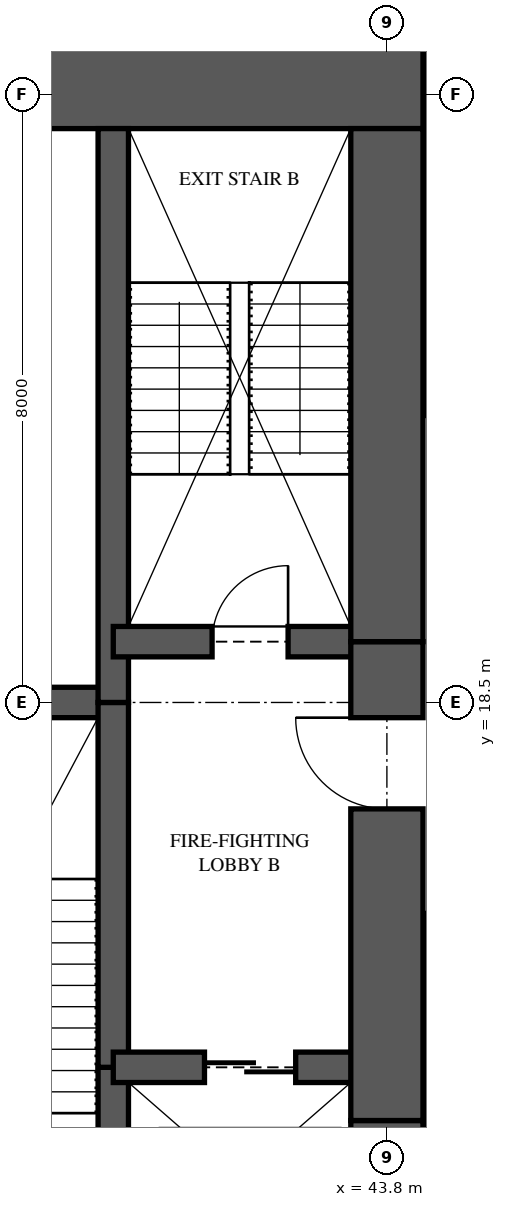
"""IFC4 building model, lengths in metres.
Left out: names, types, materials, properties, quantities, classifications, styles, units other than length and angle.
Written with IfcOpenShell. Run it as: python <this file> out.ifc"""

import sys

from ifc_helpers import new_model, si_unit, direction, frame, frame_2d, origin, place, context, subcontext, project, spatial, rectangle, extrude, element, fill, save


model = new_model("IFC4")
c1 = context("Model", 3, precision=1e-05, world=origin(), true_north=direction((0.0, 1.0)))
c2 = subcontext(c1, "Body", "Model", "MODEL_VIEW")
j1 = project(units=[si_unit("LENGTHUNIT", "METRE"), si_unit("PLANEANGLEUNIT", "RADIAN")], contexts=[c1])
p1 = place(None, origin())
s1 = spatial("IfcSite", under=j1, at=p1, CompositionType="ELEMENT")
p2 = place(p1, origin())
s2 = spatial("IfcBuilding", under=s1, at=p2, CompositionType="ELEMENT")
p3 = place(p2, frame((0.0, 0.0, 41.1)))
s3 = spatial("IfcBuildingStorey", under=s2, at=p3, CompositionType="ELEMENT", Elevation=41.1)
p4 = place(p3, frame((44.275, 26.875, 0.0), z_axis=(0.0, 0.0, 1.0), x_axis=(-1.0, 0.0, 0.0)))
e1 = element("IfcWall", 1, at=p4, inside=s3, PredefinedType="SHEAR", context=c2, shape_type="SweptSolid", body=[
    extrude(rectangle(XDim=8.375, YDim=1.65, at=frame_2d((4.188, 0.0))), origin(), (0.0, 0.0, 1.0), 3.35),
])
p5 = place(p4, frame((5.775, 0.0, 0.0)))
e2 = element("IfcOpeningElement", 2, at=p5, cuts=e1, PredefinedType="OPENING", context=c2, shape_type="SweptSolid", body=[
    extrude(rectangle(XDim=0.9, YDim=2.1, at=frame_2d((0.45, 1.05))), frame((0.0, 0.835, 0.0), z_axis=(0.0, -1.0, 0.0), x_axis=(1.0, 0.0, 0.0)), (0.0, 0.0, 1.0), 1.67),
])
p6 = place(p3, frame((43.8, 10.95, 0.0), z_axis=(0.0, 0.0, 1.0), x_axis=(0.0, 1.0, 0.0)))
e3 = element("IfcWall", 3, at=p6, inside=s3, PredefinedType="SHEAR", context=c2, shape_type="SweptSolid", body=[
    extrude(rectangle(XDim=2.05, YDim=0.95, at=frame_2d((1.025, 0.0))), origin(), (0.0, 0.0, 1.0), 3.35),
])
p7 = place(p3, frame((43.8, 13.0, 0.0), z_axis=(0.0, 0.0, 1.0), x_axis=(0.0, 1.0, 0.0)))
e4 = element("IfcWall", 4, at=p7, inside=s3, PredefinedType="SHEAR", context=c2, shape_type="SweptSolid", body=[
    extrude(rectangle(XDim=6.3, YDim=0.95, at=frame_2d((3.15, 0.0))), origin(), (0.0, 0.0, 1.0), 3.35),
])
p8 = place(p7, frame((4.1, 0.0, 0.0)))
e5 = element("IfcOpeningElement", 5, at=p8, cuts=e4, PredefinedType="OPENING", context=c2, shape_type="SweptSolid", body=[
    extrude(rectangle(XDim=1.2, YDim=2.2, at=frame_2d((0.6, 1.1))), frame((0.0, 0.485, 0.0), z_axis=(0.0, -1.0, 0.0), x_axis=(1.0, 0.0, 0.0)), (0.0, 0.0, 1.0), 0.97),
])
p9 = place(p3, frame((43.8, 19.3, 0.0), z_axis=(0.0, 0.0, 1.0), x_axis=(0.0, 1.0, 0.0)))
e6 = element("IfcWall", 6, at=p9, inside=s3, PredefinedType="SHEAR", context=c2, shape_type="SweptSolid", body=[
    extrude(rectangle(XDim=6.75, YDim=0.95, at=frame_2d((3.375, 0.0))), origin(), (0.0, 0.0, 1.0), 3.35),
])
p10 = place(p3, frame((40.2, 10.95, 0.0), z_axis=(0.0, 0.0, 1.0), x_axis=(0.0, 1.0, 0.0)))
e7 = element("IfcWall", 7, at=p10, inside=s3, PredefinedType="SHEAR", context=c2, shape_type="SweptSolid", body=[
    extrude(rectangle(XDim=2.75, YDim=0.4, at=frame_2d((1.375, 0.0))), origin(), (0.0, 0.0, 1.0), 3.35),
])
p11 = place(p3, frame((40.2, 13.7, 0.0), z_axis=(0.0, 0.0, 1.0), x_axis=(0.0, 1.0, 0.0)))
e8 = element("IfcWall", 8, at=p11, inside=s3, PredefinedType="SHEAR", context=c2, shape_type="SweptSolid", body=[
    extrude(rectangle(XDim=4.8, YDim=0.4, at=frame_2d((2.4, 0.0))), origin(), (0.0, 0.0, 1.0), 3.35),
])
p12 = place(p3, frame((40.2, 18.5, 0.0), z_axis=(0.0, 0.0, 1.0), x_axis=(0.0, 1.0, 0.0)))
e9 = element("IfcWall", 9, at=p12, inside=s3, PredefinedType="SHEAR", context=c2, shape_type="SweptSolid", body=[
    extrude(rectangle(XDim=7.55, YDim=0.4, at=frame_2d((3.775, 0.0))), origin(), (0.0, 0.0, 1.0), 3.35),
])
p13 = place(p3, frame((35.9, 18.5, 0.0), z_axis=(0.0, 0.0, 1.0), x_axis=(1.0, 0.0, 0.0)))
e10 = element("IfcWall", 10, at=p13, inside=s3, PredefinedType="SHEAR", context=c2, shape_type="SweptSolid", body=[
    extrude(rectangle(XDim=4.3, YDim=0.4, at=frame_2d((2.15, 0.0))), origin(), (0.0, 0.0, 1.0), 3.35),
])
p14 = place(p3, frame((40.2, 13.7, 0.0), z_axis=(0.0, 0.0, 1.0), x_axis=(1.0, 0.0, 0.0)))
e11 = element("IfcWall", 11, at=p14, inside=s3, PredefinedType="SHEAR", context=c2, shape_type="SweptSolid", body=[
    extrude(rectangle(XDim=3.6, YDim=0.4, at=frame_2d((1.8, 0.0))), origin(), (0.0, 0.0, 1.0), 3.35),
])
p15 = place(p14, frame((1.2, 0.0, 0.0)))
e12 = element("IfcOpeningElement", 12, at=p15, cuts=e11, PredefinedType="OPENING", context=c2, shape_type="SweptSolid", body=[
    extrude(rectangle(XDim=1.2, YDim=2.1, at=frame_2d((0.6, 1.05))), frame((0.0, 0.21, 0.0), z_axis=(0.0, -1.0, 0.0), x_axis=(1.0, 0.0, 0.0)), (0.0, 0.0, 1.0), 0.42),
])
p16 = place(p3, frame((40.2, 19.3, 0.0), z_axis=(0.0, 0.0, 1.0), x_axis=(1.0, 0.0, 0.0)))
e13 = element("IfcWall", 13, at=p16, inside=s3, PredefinedType="SHEAR", context=c2, shape_type="SweptSolid", body=[
    extrude(rectangle(XDim=3.6, YDim=0.4, at=frame_2d((1.8, 0.0))), origin(), (0.0, 0.0, 1.0), 3.35),
])
p17 = place(p16, frame((1.3, 0.0, 0.0)))
e14 = element("IfcOpeningElement", 14, at=p17, cuts=e13, PredefinedType="OPENING", context=c2, shape_type="SweptSolid", body=[
    extrude(rectangle(XDim=1.0, YDim=2.1, at=frame_2d((0.5, 1.05))), frame((0.0, 0.21, 0.0), z_axis=(0.0, -1.0, 0.0), x_axis=(1.0, 0.0, 0.0)), (0.0, 0.0, 1.0), 0.42),
])
p18 = place(p17, origin())
e15 = element("IfcDoor", 15, at=p18, inside=s3, OperationType="SINGLE_SWING_RIGHT", PredefinedType="DOOR", context=c2, shape_type="SweptSolid", body=[
    extrude(rectangle(XDim=1.0, YDim=2.1, at=frame_2d((0.5, 1.05))), frame((0.0, 0.025, 0.0), z_axis=(0.0, -1.0, 0.0), x_axis=(1.0, 0.0, 0.0)), (0.0, 0.0, 1.0), 0.05),
])
fill(e14, e15)
p19 = place(p8, origin())
e16 = element("IfcDoor", 16, at=p19, inside=s3, OperationType="SINGLE_SWING_RIGHT", PredefinedType="DOOR", context=c2, shape_type="SweptSolid", body=[
    extrude(rectangle(XDim=1.2, YDim=2.2, at=frame_2d((0.6, 1.1))), frame((0.0, 0.025, 0.0), z_axis=(0.0, -1.0, 0.0), x_axis=(1.0, 0.0, 0.0)), (0.0, 0.0, 1.0), 0.05),
])
fill(e5, e16)
p20 = place(p15, origin())
e17 = element("IfcDoor", 17, at=p20, inside=s3, OperationType="SLIDING_TO_LEFT", PredefinedType="DOOR", context=c2, shape_type="SweptSolid", body=[
    extrude(rectangle(XDim=1.2, YDim=2.1, at=frame_2d((0.6, 1.05))), frame((0.0, 0.025, 0.0), z_axis=(0.0, -1.0, 0.0), x_axis=(1.0, 0.0, 0.0)), (0.0, 0.0, 1.0), 0.05),
])
fill(e12, e17)
save(model, sys.argv[1])
